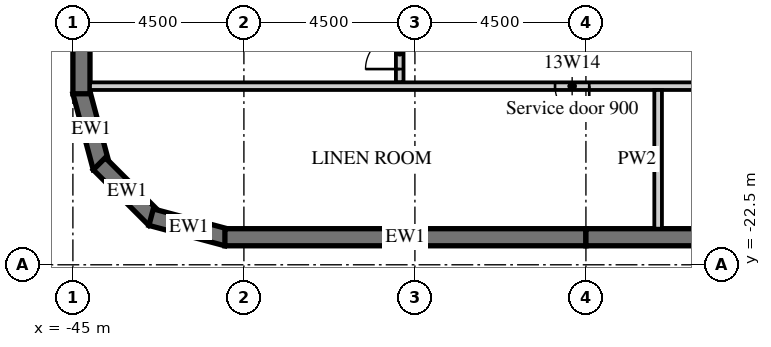
"""IFC4 building model, lengths in metres.
Left out: names, types, materials, properties, quantities, classifications, styles, units other than length and angle.
Written with IfcOpenShell. Run it as: python <this file> out.ifc"""

import sys

from ifc_helpers import new_model, si_unit, direction, frame, frame_2d, origin, place, context, subcontext, project, spatial, polyline, rectangle, outline, extrude, element, fill, save


model = new_model("IFC4")
c1 = context("Model", 3, precision=1e-05, world=origin(), true_north=direction((0.0, 1.0)))
c2 = subcontext(c1, "Body", "Model", "MODEL_VIEW")
j1 = project(units=[si_unit("LENGTHUNIT", "METRE"), si_unit("PLANEANGLEUNIT", "RADIAN")], contexts=[c1])
p1 = place(None, origin())
s1 = spatial("IfcSite", under=j1, at=p1, CompositionType="ELEMENT")
p2 = place(p1, origin())
s2 = spatial("IfcBuilding", under=s1, at=p2, CompositionType="ELEMENT")
p3 = place(p2, frame((0.0, 0.0, 73.2)))
s3 = spatial("IfcBuildingStorey", under=s2, at=p3, CompositionType="ELEMENT", Elevation=73.2)
p4 = place(p3, frame((-44.783, -17.942, 0.0), z_axis=(0.0, 0.0, 1.0), x_axis=(0.25881466832, -0.965926999034, 0.0)))
e1 = element("IfcWall", 1, at=p4, inside=s3, PredefinedType="SOLIDWALL", context=c2, shape_type="SweptSolid", body=[
    extrude(outline(polyline([(0.0, -0.225), (2.071, -0.225), (1.95, 0.225), (0.121, 0.225), (0.0, -0.225)])), origin(), (0.0, 0.0, 1.0), 3.02),
])
p5 = place(p3, frame((-44.305, -19.841, 0.0), z_axis=(0.0, 0.0, 1.0), x_axis=(0.707106781187, -0.707106781187, 0.0)))
e2 = element("IfcWall", 2, at=p5, inside=s3, PredefinedType="SOLIDWALL", context=c2, shape_type="SweptSolid", body=[
    extrude(outline(polyline([(0.0, -0.225), (2.071, -0.225), (1.95, 0.225), (0.121, 0.225), (0.0, -0.225)])), origin(), (0.0, 0.0, 1.0), 3.02),
])
p6 = place(p3, frame((-42.942, -21.247, 0.0), z_axis=(0.0, 0.0, 1.0), x_axis=(0.965926999034, -0.25881466832, 0.0)))
e3 = element("IfcWall", 3, at=p6, inside=s3, PredefinedType="SOLIDWALL", context=c2, shape_type="SweptSolid", body=[
    extrude(outline(polyline([(-0.0, -0.225), (2.07, -0.225), (1.95, 0.225), (0.12, 0.225), (-0.0, -0.225)])), origin(), (0.0, 0.0, 1.0), 3.02),
])
p7 = place(p3, frame((-41.0, -21.775, 0.0), z_axis=(0.0, 0.0, 1.0), x_axis=(1.0, 0.0, 0.0)))
e4 = element("IfcWall", 4, at=p7, inside=s3, PredefinedType="SOLIDWALL", context=c2, shape_type="SweptSolid", body=[
    extrude(rectangle(XDim=9.5, YDim=0.45, at=frame_2d((4.75, 0.0))), origin(), (0.0, 0.0, 1.0), 3.02),
])
p8 = place(p3, frame((-31.5, -21.775, 0.0), z_axis=(0.0, 0.0, 1.0), x_axis=(1.0, 0.0, 0.0)))
e5 = element("IfcWall", 5, at=p8, inside=s3, PredefinedType="SOLIDWALL", context=c2, shape_type="SweptSolid", body=[
    extrude(rectangle(XDim=18.0, YDim=0.45, at=frame_2d((9.0, 0.0))), origin(), (0.0, 0.0, 1.0), 3.02),
])
p9 = place(p3, frame((-44.775, 18.0, 0.0), z_axis=(0.0, 0.0, 1.0), x_axis=(0.0, -1.0, 0.0)))
e6 = element("IfcWall", 6, at=p9, inside=s3, PredefinedType="SOLIDWALL", context=c2, shape_type="SweptSolid", body=[
    extrude(rectangle(XDim=36.0, YDim=0.45, at=frame_2d((18.0, 0.0))), origin(), (0.0, 0.0, 1.0), 3.02),
])
p10 = place(p9, frame((3.9, 0.0, 0.45)))
e7 = element("IfcOpeningElement", 7, at=p10, cuts=e6, PredefinedType="OPENING", context=c2, shape_type="SweptSolid", body=[
    extrude(rectangle(XDim=3.3, YDim=2.25, at=frame_2d((1.65, 1.125))), frame((0.0, 0.235, 0.0), z_axis=(0.0, -1.0, 0.0), x_axis=(1.0, 0.0, 0.0)), (0.0, 0.0, 1.0), 0.47),
])
p11 = place(p9, frame((8.4, 0.0, 0.45)))
e8 = element("IfcOpeningElement", 8, at=p11, cuts=e6, PredefinedType="OPENING", context=c2, shape_type="SweptSolid", body=[
    extrude(rectangle(XDim=3.3, YDim=2.25, at=frame_2d((1.65, 1.125))), frame((0.0, 0.235, 0.0), z_axis=(0.0, -1.0, 0.0), x_axis=(1.0, 0.0, 0.0)), (0.0, 0.0, 1.0), 0.47),
])
p12 = place(p9, frame((12.9, 0.0, 0.45)))
e9 = element("IfcOpeningElement", 9, at=p12, cuts=e6, PredefinedType="OPENING", context=c2, shape_type="SweptSolid", body=[
    extrude(rectangle(XDim=3.3, YDim=2.25, at=frame_2d((1.65, 1.125))), frame((0.0, 0.235, 0.0), z_axis=(0.0, -1.0, 0.0), x_axis=(1.0, 0.0, 0.0)), (0.0, 0.0, 1.0), 0.47),
])
p13 = place(p3, frame((-36.4, -17.7, 0.0), z_axis=(0.0, 0.0, 1.0), x_axis=(0.0, 1.0, 0.0)))
e10 = element("IfcWall", 10, at=p13, inside=s3, PredefinedType="PARTITIONING", context=c2, shape_type="SweptSolid", body=[
    extrude(rectangle(XDim=15.95, YDim=0.2, at=frame_2d((7.975, 0.0))), origin(), (0.0, 0.0, 1.0), 3.02),
])
p14 = place(p13, frame((0.35, 0.0, 0.0)))
e11 = element("IfcOpeningElement", 11, at=p14, cuts=e10, PredefinedType="OPENING", context=c2, shape_type="SweptSolid", body=[
    extrude(rectangle(XDim=0.9, YDim=2.1, at=frame_2d((0.45, 1.05))), frame((0.0, 0.11, 0.0), z_axis=(0.0, -1.0, 0.0), x_axis=(1.0, 0.0, 0.0)), (0.0, 0.0, 1.0), 0.22),
])
p15 = place(p3, frame((-44.55, -17.8, 0.0), z_axis=(0.0, 0.0, 1.0), x_axis=(1.0, 0.0, 0.0)))
e12 = element("IfcWall", 12, at=p15, inside=s3, PredefinedType="PARTITIONING", context=c2, shape_type="SweptSolid", body=[
    extrude(rectangle(XDim=30.95, YDim=0.2, at=frame_2d((15.475, 0.0))), origin(), (0.0, 0.0, 1.0), 3.02),
])
p16 = place(p15, frame((12.238, 0.0, 0.0)))
e13 = element("IfcOpeningElement", 13, at=p16, cuts=e12, PredefinedType="OPENING", context=c2, shape_type="SweptSolid", body=[
    extrude(rectangle(XDim=0.9, YDim=2.1, at=frame_2d((0.45, 1.05))), frame((0.0, 0.11, 0.0), z_axis=(0.0, -1.0, 0.0), x_axis=(1.0, 0.0, 0.0)), (0.0, 0.0, 1.0), 0.22),
])
p17 = place(p15, frame((20.538, 0.0, 0.0)))
e14 = element("IfcOpeningElement", 14, at=p17, cuts=e12, PredefinedType="OPENING", context=c2, shape_type="SweptSolid", body=[
    extrude(rectangle(XDim=0.9, YDim=2.1, at=frame_2d((0.45, 1.05))), frame((0.0, 0.11, 0.0), z_axis=(0.0, -1.0, 0.0), x_axis=(1.0, 0.0, 0.0)), (0.0, 0.0, 1.0), 0.22),
])
p18 = place(p3, frame((-29.6, -21.55, 0.0), z_axis=(0.0, 0.0, 1.0), x_axis=(0.0, 1.0, 0.0)))
e15 = element("IfcWall", 15, at=p18, inside=s3, PredefinedType="PARTITIONING", context=c2, shape_type="SweptSolid", body=[
    extrude(rectangle(XDim=3.65, YDim=0.2, at=frame_2d((1.825, 0.0))), origin(), (0.0, 0.0, 1.0), 3.02),
])
p19 = place(p16, origin())
e16 = element("IfcDoor", 16, at=p19, inside=s3, OperationType="SINGLE_SWING_RIGHT", PredefinedType="DOOR", context=c2, shape_type="SweptSolid", body=[
    extrude(rectangle(XDim=0.9, YDim=2.1, at=frame_2d((0.45, 1.05))), frame((0.0, 0.025, 0.0), z_axis=(0.0, -1.0, 0.0), x_axis=(1.0, 0.0, 0.0)), (0.0, 0.0, 1.0), 0.05),
])
fill(e13, e16)
p20 = place(p14, origin())
e17 = element("IfcDoor", 17, at=p20, inside=s3, OperationType="SINGLE_SWING_LEFT", PredefinedType="DOOR", context=c2, shape_type="SweptSolid", body=[
    extrude(rectangle(XDim=0.9, YDim=2.1, at=frame_2d((0.45, 1.05))), frame((0.0, 0.025, 0.0), z_axis=(0.0, -1.0, 0.0), x_axis=(1.0, 0.0, 0.0)), (0.0, 0.0, 1.0), 0.05),
])
fill(e11, e17)
save(model, sys.argv[1])
